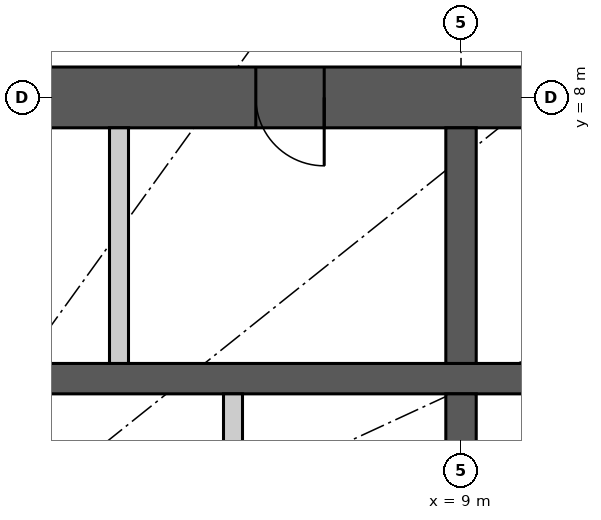
"""IFC4 building model, lengths in metres.
Left out: names, types, materials, properties, quantities, classifications, styles, units other than length and angle.
Written with IfcOpenShell. Run it as: python <this file> out.ifc"""

import sys

from ifc_helpers import new_model, si_unit, direction, frame, frame_2d, origin, place, context, subcontext, project, spatial, rectangle, extrude, element, fill, save


model = new_model("IFC4")
c1 = context("Model", 3, precision=1e-05, world=origin(), true_north=direction((0.0, 1.0)))
c2 = subcontext(c1, "Body", "Model", "MODEL_VIEW")
j1 = project(units=[si_unit("LENGTHUNIT", "METRE"), si_unit("PLANEANGLEUNIT", "RADIAN")], contexts=[c1])
p1 = place(None, origin())
s1 = spatial("IfcSite", under=j1, at=p1, CompositionType="ELEMENT")
p2 = place(p1, origin())
s2 = spatial("IfcBuilding", under=s1, at=p2, CompositionType="ELEMENT")
p3 = place(p2, frame((0.0, 0.0, 105.6)))
s3 = spatial("IfcBuildingStorey", under=s2, at=p3, CompositionType="ELEMENT", Elevation=105.6)
p4 = place(p3, frame((-12.4, 8.0, 0.0), z_axis=(0.0, 0.0, 1.0), x_axis=(1.0, 0.0, 0.0)))
e1 = element("IfcWall", 1, at=p4, inside=s3, PredefinedType="SHEAR", context=c2, shape_type="SweptSolid", body=[
    extrude(rectangle(XDim=24.8, YDim=0.8, at=frame_2d((12.4, 0.0))), origin(), (0.0, 0.0, 1.0), 3.3),
])
p5 = place(p4, frame((11.1, 0.0, 0.0)))
e2 = element("IfcOpeningElement", 2, at=p5, cuts=e1, PredefinedType="OPENING", context=c2, shape_type="SweptSolid", body=[
    extrude(rectangle(XDim=1.2, YDim=2.2, at=frame_2d((0.6, 1.1))), frame((0.0, 0.41, 0.0), z_axis=(0.0, -1.0, 0.0), x_axis=(1.0, 0.0, 0.0)), (0.0, 0.0, 1.0), 0.82),
])
p6 = place(p4, frame((18.7, 0.0, 0.0)))
e3 = element("IfcOpeningElement", 3, at=p6, cuts=e1, PredefinedType="OPENING", context=c2, shape_type="SweptSolid", body=[
    extrude(rectangle(XDim=0.9, YDim=2.2, at=frame_2d((0.45, 1.1))), frame((0.0, 0.41, 0.0), z_axis=(0.0, -1.0, 0.0), x_axis=(1.0, 0.0, 0.0)), (0.0, 0.0, 1.0), 0.82),
])
p7 = place(p3, frame((-11.6, 4.3, 0.0), z_axis=(0.0, 0.0, 1.0), x_axis=(1.0, 0.0, 0.0)))
e4 = element("IfcWall", 4, at=p7, inside=s3, PredefinedType="SHEAR", context=c2, shape_type="SweptSolid", body=[
    extrude(rectangle(XDim=23.2, YDim=0.4, at=frame_2d((11.6, 0.0))), origin(), (0.0, 0.0, 1.0), 3.3),
])
p8 = place(p3, frame((9.0, 4.5, 0.0), z_axis=(0.0, 0.0, 1.0), x_axis=(0.0, 1.0, 0.0)))
e5 = element("IfcWall", 5, at=p8, inside=s3, PredefinedType="SHEAR", context=c2, shape_type="SweptSolid", body=[
    extrude(rectangle(XDim=3.1, YDim=0.4, at=frame_2d((1.55, 0.0))), origin(), (0.0, 0.0, 1.0), 3.3),
])
p9 = place(p3, frame((9.0, 1.75, 0.0), z_axis=(0.0, 0.0, 1.0), x_axis=(0.0, 1.0, 0.0)))
e6 = element("IfcWall", 6, at=p9, inside=s3, PredefinedType="SHEAR", context=c2, shape_type="SweptSolid", body=[
    extrude(rectangle(XDim=2.35, YDim=0.4, at=frame_2d((1.175, 0.0))), origin(), (0.0, 0.0, 1.0), 3.3),
])
p10 = place(p3, frame((4.5, 4.5, 0.0), z_axis=(0.0, 0.0, 1.0), x_axis=(0.0, 1.0, 0.0)))
e7 = element("IfcWall", 7, at=p10, inside=s3, PredefinedType="PARTITIONING", context=c2, shape_type="SweptSolid", body=[
    extrude(rectangle(XDim=3.1, YDim=0.25, at=frame_2d((1.55, 0.0))), origin(), (0.0, 0.0, 1.0), 3.3),
])
p11 = place(p3, frame((6.0, 1.75, 0.0), z_axis=(0.0, 0.0, 1.0), x_axis=(0.0, 1.0, 0.0)))
e8 = element("IfcWall", 8, at=p11, inside=s3, PredefinedType="PARTITIONING", context=c2, shape_type="SweptSolid", body=[
    extrude(rectangle(XDim=2.35, YDim=0.25, at=frame_2d((1.175, 0.0))), origin(), (0.0, 0.0, 1.0), 3.3),
])
p12 = place(p6, origin())
e9 = element("IfcDoor", 9, at=p12, inside=s3, OperationType="SINGLE_SWING_RIGHT", PredefinedType="DOOR", context=c2, shape_type="SweptSolid", body=[
    extrude(rectangle(XDim=0.9, YDim=2.2, at=frame_2d((0.45, 1.1))), frame((0.0, 0.025, 0.0), z_axis=(0.0, -1.0, 0.0), x_axis=(1.0, 0.0, 0.0)), (0.0, 0.0, 1.0), 0.05),
])
fill(e3, e9)
save(model, sys.argv[1])
